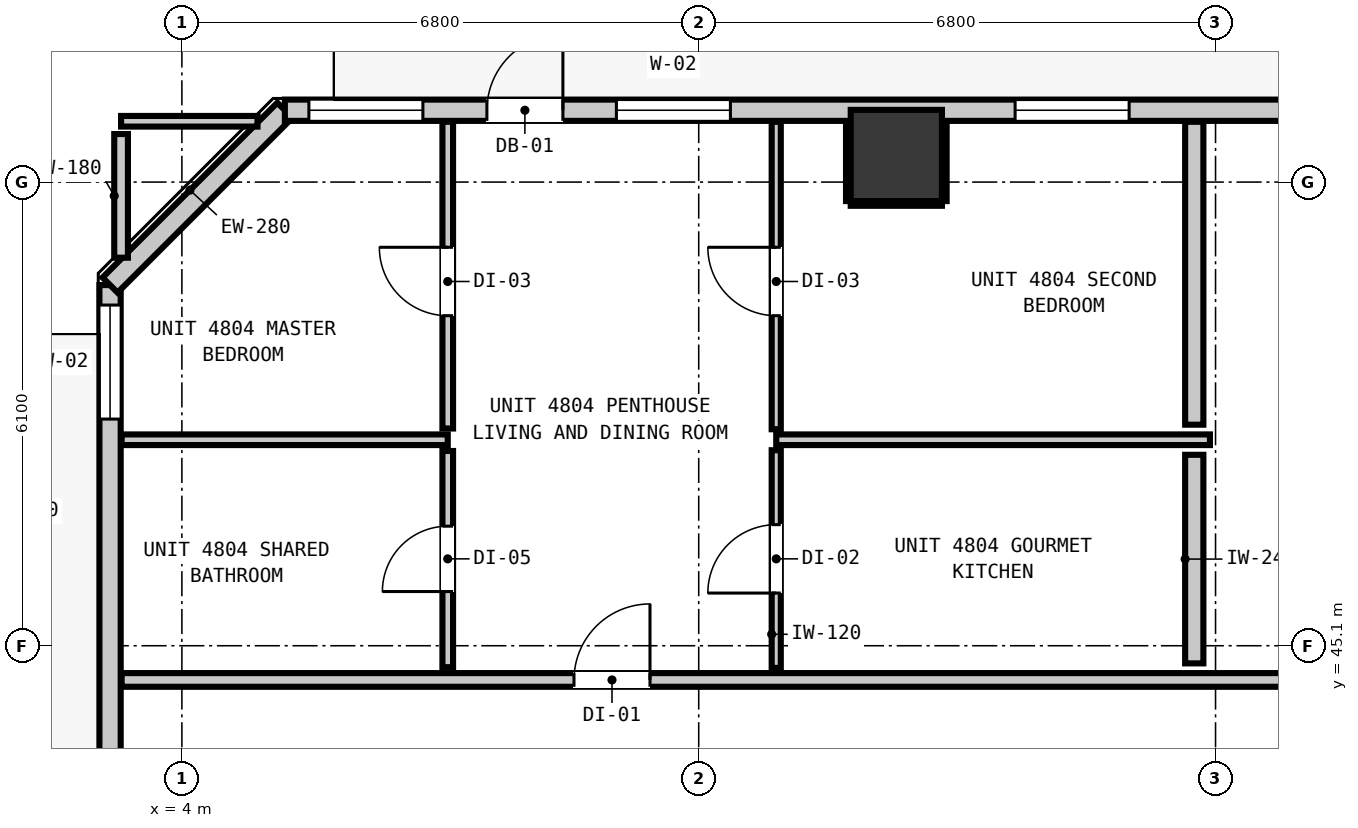
"""IFC4 building model, lengths in metres.
Left out: names, types, materials, properties, quantities, classifications, styles, units other than length and angle.
Written with IfcOpenShell. Run it as: python <this file> out.ifc"""

import sys

from ifc_helpers import new_model, si_unit, direction, frame, frame_2d, origin, origin_2d, place, context, subcontext, project, spatial, rectangle, extrude, element, fill, save


model = new_model("IFC4")
c1 = context("Model", 3, precision=1e-05, world=origin(), true_north=direction((0.0, 1.0)))
c2 = subcontext(c1, "Body", "Model", "MODEL_VIEW")
j1 = project(units=[si_unit("LENGTHUNIT", "METRE"), si_unit("PLANEANGLEUNIT", "RADIAN")], contexts=[c1])
p1 = place(None, origin())
s1 = spatial("IfcSite", under=j1, at=p1, CompositionType="ELEMENT")
p2 = place(p1, origin())
s2 = spatial("IfcBuilding", under=s1, at=p2, CompositionType="ELEMENT")
p3 = place(p2, frame((0.0, 0.0, 165.84)))
s3 = spatial("IfcBuildingStorey", under=s2, at=p3, CompositionType="ELEMENT", Elevation=165.84)
p4 = place(p3, frame((13.4, 51.55, -0.2), z_axis=(0.0, 0.0, 1.0), x_axis=(1.0, 0.0, 0.0)))
e1 = element("IfcColumn", 1, at=p4, inside=s3, PredefinedType="COLUMN", context=c2, shape_type="SweptSolid", body=[
    extrude(rectangle(XDim=1.2, YDim=1.2, at=origin_2d()), origin(), (0.0, 0.0, 1.0), 3.52),
])
p5 = place(p3, frame((3.055, 17.555, 0.0), z_axis=(0.0, 0.0, 1.0), x_axis=(0.0, 1.0, 0.0)))
e2 = element("IfcWall", 2, at=p5, inside=s3, PredefinedType="STANDARD", context=c2, shape_type="SweptSolid", body=[
    extrude(rectangle(XDim=32.29, YDim=0.28, at=frame_2d((16.145, 0.0))), origin(), (0.0, 0.0, 1.0), 3.08),
])
p6 = place(p5, frame((6.871, 0.0, 0.0)))
e3 = element("IfcOpeningElement", 3, at=p6, cuts=e2, PredefinedType="OPENING", context=c2, shape_type="SweptSolid", body=[
    extrude(rectangle(XDim=1.0, YDim=2.15, at=frame_2d((0.5, 1.075))), frame((0.0, 0.15, 0.0), z_axis=(0.0, -1.0, 0.0), x_axis=(1.0, 0.0, 0.0)), (0.0, 0.0, 1.0), 0.3),
])
p7 = place(p5, frame((30.527, 0.0, 0.85)))
e4 = element("IfcOpeningElement", 4, at=p7, cuts=e2, PredefinedType="OPENING", context=c2, shape_type="SweptSolid", body=[
    extrude(rectangle(XDim=1.5, YDim=1.8, at=frame_2d((0.75, 0.9))), frame((0.0, 0.15, 0.0), z_axis=(0.0, -1.0, 0.0), x_axis=(1.0, 0.0, 0.0)), (0.0, 0.0, 1.0), 0.3),
])
p8 = place(p5, frame((8.375, 0.0, 0.85)))
e5 = element("IfcOpeningElement", 5, at=p8, cuts=e2, PredefinedType="OPENING", context=c2, shape_type="SweptSolid", body=[
    extrude(rectangle(XDim=1.5, YDim=1.8, at=frame_2d((0.75, 0.9))), frame((0.0, 0.15, 0.0), z_axis=(0.0, -1.0, 0.0), x_axis=(1.0, 0.0, 0.0)), (0.0, 0.0, 1.0), 0.3),
])
p9 = place(p5, frame((10.762, 0.0, 0.85)))
e6 = element("IfcOpeningElement", 6, at=p9, cuts=e2, PredefinedType="OPENING", context=c2, shape_type="SweptSolid", body=[
    extrude(rectangle(XDim=1.5, YDim=1.8, at=frame_2d((0.75, 0.9))), frame((0.0, 0.15, 0.0), z_axis=(0.0, -1.0, 0.0), x_axis=(1.0, 0.0, 0.0)), (0.0, 0.0, 1.0), 0.3),
])
p10 = place(p5, frame((17.075, 0.0, 0.85)))
e7 = element("IfcOpeningElement", 7, at=p10, cuts=e2, PredefinedType="OPENING", context=c2, shape_type="SweptSolid", body=[
    extrude(rectangle(XDim=1.5, YDim=1.8, at=frame_2d((0.75, 0.9))), frame((0.0, 0.15, 0.0), z_axis=(0.0, -1.0, 0.0), x_axis=(1.0, 0.0, 0.0)), (0.0, 0.0, 1.0), 0.3),
])
p11 = place(p5, frame((20.113, 0.0, 0.85)))
e8 = element("IfcOpeningElement", 8, at=p11, cuts=e2, PredefinedType="OPENING", context=c2, shape_type="SweptSolid", body=[
    extrude(rectangle(XDim=1.05, YDim=1.65, at=frame_2d((0.525, 0.825))), frame((0.0, 0.15, 0.0), z_axis=(0.0, -1.0, 0.0), x_axis=(1.0, 0.0, 0.0)), (0.0, 0.0, 1.0), 0.3),
])
p12 = place(p3, frame((3.055, 49.845, 0.0), z_axis=(0.0, 0.0, 1.0), x_axis=(0.707106781187, 0.707106781187, 0.0)))
e9 = element("IfcWall", 9, at=p12, inside=s3, PredefinedType="STANDARD", context=c2, shape_type="SweptSolid", body=[
    extrude(rectangle(XDim=3.253, YDim=0.28, at=frame_2d((1.626, 0.0))), origin(), (0.0, 0.0, 1.0), 3.08),
])
p13 = place(p3, frame((5.355, 52.145, 0.0), z_axis=(0.0, 0.0, 1.0), x_axis=(1.0, 0.0, 0.0)))
e10 = element("IfcWall", 10, at=p13, inside=s3, PredefinedType="STANDARD", context=c2, shape_type="SweptSolid", body=[
    extrude(rectangle(XDim=35.09, YDim=0.28, at=frame_2d((17.545, 0.0))), origin(), (0.0, 0.0, 1.0), 3.08),
])
p14 = place(p13, frame((2.658, 0.0, 0.0)))
e11 = element("IfcOpeningElement", 11, at=p14, cuts=e10, PredefinedType="OPENING", context=c2, shape_type="SweptSolid", body=[
    extrude(rectangle(XDim=1.0, YDim=2.15, at=frame_2d((0.5, 1.075))), frame((0.0, 0.15, 0.0), z_axis=(0.0, -1.0, 0.0), x_axis=(1.0, 0.0, 0.0)), (0.0, 0.0, 1.0), 0.3),
])
p15 = place(p13, frame((4.362, 0.0, 0.85)))
e12 = element("IfcOpeningElement", 12, at=p15, cuts=e10, PredefinedType="OPENING", context=c2, shape_type="SweptSolid", body=[
    extrude(rectangle(XDim=1.5, YDim=1.8, at=frame_2d((0.75, 0.9))), frame((0.0, 0.15, 0.0), z_axis=(0.0, -1.0, 0.0), x_axis=(1.0, 0.0, 0.0)), (0.0, 0.0, 1.0), 0.3),
])
p16 = place(p13, frame((0.316, 0.0, 0.85)))
e13 = element("IfcOpeningElement", 13, at=p16, cuts=e10, PredefinedType="OPENING", context=c2, shape_type="SweptSolid", body=[
    extrude(rectangle(XDim=1.5, YDim=1.8, at=frame_2d((0.75, 0.9))), frame((0.0, 0.15, 0.0), z_axis=(0.0, -1.0, 0.0), x_axis=(1.0, 0.0, 0.0)), (0.0, 0.0, 1.0), 0.3),
])
p17 = place(p13, frame((9.608, 0.0, 0.85)))
e14 = element("IfcOpeningElement", 14, at=p17, cuts=e10, PredefinedType="OPENING", context=c2, shape_type="SweptSolid", body=[
    extrude(rectangle(XDim=1.5, YDim=1.8, at=frame_2d((0.75, 0.9))), frame((0.0, 0.15, 0.0), z_axis=(0.0, -1.0, 0.0), x_axis=(1.0, 0.0, 0.0)), (0.0, 0.0, 1.0), 0.3),
])
p18 = place(p13, frame((18.355, 0.0, 0.85)))
e15 = element("IfcOpeningElement", 15, at=p18, cuts=e10, PredefinedType="OPENING", context=c2, shape_type="SweptSolid", body=[
    extrude(rectangle(XDim=1.5, YDim=1.8, at=frame_2d((0.75, 0.9))), frame((0.0, 0.15, 0.0), z_axis=(0.0, -1.0, 0.0), x_axis=(1.0, 0.0, 0.0)), (0.0, 0.0, 1.0), 0.3),
])
p19 = place(p13, frame((27.784, 0.0, 0.85)))
e16 = element("IfcOpeningElement", 16, at=p19, cuts=e10, PredefinedType="OPENING", context=c2, shape_type="SweptSolid", body=[
    extrude(rectangle(XDim=1.5, YDim=1.8, at=frame_2d((0.75, 0.9))), frame((0.0, 0.15, 0.0), z_axis=(0.0, -1.0, 0.0), x_axis=(1.0, 0.0, 0.0)), (0.0, 0.0, 1.0), 0.3),
])
p20 = place(p3, frame((3.207, 44.65, 0.0), z_axis=(0.0, 0.0, 1.0), x_axis=(1.0, 0.0, 0.0)))
e17 = element("IfcWall", 17, at=p20, inside=s3, PredefinedType="PARTITIONING", context=c2, shape_type="SweptSolid", body=[
    extrude(rectangle(XDim=39.386, YDim=0.18, at=frame_2d((19.693, 0.0))), origin(), (0.0, 0.0, 1.0), 3.08),
])
p21 = place(p20, frame((5.952, 0.0, 0.0)))
e18 = element("IfcOpeningElement", 18, at=p21, cuts=e17, PredefinedType="OPENING", context=c2, shape_type="SweptSolid", body=[
    extrude(rectangle(XDim=1.0, YDim=2.15, at=frame_2d((0.5, 1.075))), frame((0.0, 0.1, 0.0), z_axis=(0.0, -1.0, 0.0), x_axis=(1.0, 0.0, 0.0)), (0.0, 0.0, 1.0), 0.2),
])
p22 = place(p20, frame((18.866, 0.0, 0.0)))
e19 = element("IfcOpeningElement", 19, at=p22, cuts=e17, PredefinedType="OPENING", context=c2, shape_type="SweptSolid", body=[
    extrude(rectangle(XDim=1.0, YDim=2.15, at=frame_2d((0.5, 1.075))), frame((0.0, 0.1, 0.0), z_axis=(0.0, -1.0, 0.0), x_axis=(1.0, 0.0, 0.0)), (0.0, 0.0, 1.0), 0.2),
])
p23 = place(p20, frame((33.508, 0.0, 0.0)))
e20 = element("IfcOpeningElement", 20, at=p23, cuts=e17, PredefinedType="OPENING", context=c2, shape_type="SweptSolid", body=[
    extrude(rectangle(XDim=0.9, YDim=2.1, at=frame_2d((0.45, 1.05))), frame((0.0, 0.1, 0.0), z_axis=(0.0, -1.0, 0.0), x_axis=(1.0, 0.0, 0.0)), (0.0, 0.0, 1.0), 0.2),
])
p24 = place(p3, frame((3.207, 47.81, 0.0), z_axis=(0.0, 0.0, 1.0), x_axis=(1.0, 0.0, 0.0)))
e21 = element("IfcWall", 21, at=p24, inside=s3, PredefinedType="PARTITIONING", context=c2, shape_type="SweptSolid", body=[
    extrude(rectangle(XDim=4.291, YDim=0.14, at=frame_2d((2.146, 0.0))), origin(), (0.0, 0.0, 1.0), 3.08),
])
p25 = place(p3, frame((11.82, 47.81, 0.0), z_axis=(0.0, 0.0, 1.0), x_axis=(1.0, 0.0, 0.0)))
e22 = element("IfcWall", 22, at=p25, inside=s3, PredefinedType="PARTITIONING", context=c2, shape_type="SweptSolid", body=[
    extrude(rectangle(XDim=5.706, YDim=0.14, at=frame_2d((2.853, 0.0))), origin(), (0.0, 0.0, 1.0), 3.08),
])
p26 = place(p3, frame((3.2, 52.0, 0.0), z_axis=(0.0, 0.0, 1.0), x_axis=(1.0, 0.0, 0.0)))
e23 = element("IfcWall", 23, at=p26, inside=s3, PredefinedType="PARTITIONING", context=c2, shape_type="SweptSolid", body=[
    extrude(rectangle(XDim=1.795, YDim=0.14, at=frame_2d((0.897, 0.0))), origin(), (0.0, 0.0, 1.0), 3.08),
])
p27 = place(p3, frame((17.32, 44.868, 0.0), z_axis=(0.0, 0.0, 1.0), x_axis=(0.0, 1.0, 0.0)))
e24 = element("IfcWall", 24, at=p27, inside=s3, PredefinedType="PARTITIONING", context=c2, shape_type="SweptSolid", body=[
    extrude(rectangle(XDim=2.744, YDim=0.24, at=frame_2d((1.372, 0.0))), origin(), (0.0, 0.0, 1.0), 3.08),
])
p28 = place(p3, frame((17.32, 48.008, 0.0), z_axis=(0.0, 0.0, 1.0), x_axis=(0.0, 1.0, 0.0)))
e25 = element("IfcWall", 25, at=p28, inside=s3, PredefinedType="PARTITIONING", context=c2, shape_type="SweptSolid", body=[
    extrude(rectangle(XDim=3.985, YDim=0.24, at=frame_2d((1.992, 0.0))), origin(), (0.0, 0.0, 1.0), 3.08),
])
p29 = place(p3, frame((3.2, 50.205, 0.0), z_axis=(0.0, 0.0, 1.0), x_axis=(0.0, 1.0, 0.0)))
e26 = element("IfcWall", 26, at=p29, inside=s3, PredefinedType="PARTITIONING", context=c2, shape_type="SweptSolid", body=[
    extrude(rectangle(XDim=1.627, YDim=0.18, at=frame_2d((0.813, 0.0))), origin(), (0.0, 0.0, 1.0), 3.08),
])
p30 = place(p3, frame((7.498, 44.818, 0.0), z_axis=(0.0, 0.0, 1.0), x_axis=(0.0, 1.0, 0.0)))
e27 = element("IfcWall", 27, at=p30, inside=s3, PredefinedType="PARTITIONING", context=c2, shape_type="SweptSolid", body=[
    extrude(rectangle(XDim=2.844, YDim=0.14, at=frame_2d((1.422, 0.0))), origin(), (0.0, 0.0, 1.0), 3.08),
])
p31 = place(p30, frame((0.995, 0.0, 0.0)))
e28 = element("IfcOpeningElement", 28, at=p31, cuts=e27, PredefinedType="OPENING", context=c2, shape_type="SweptSolid", body=[
    extrude(rectangle(XDim=0.86, YDim=2.02, at=frame_2d((0.43, 1.01))), frame((0.0, 0.08, 0.0), z_axis=(0.0, -1.0, 0.0), x_axis=(1.0, 0.0, 0.0)), (0.0, 0.0, 1.0), 0.16),
])
p32 = place(p3, frame((7.498, 47.958, 0.0), z_axis=(0.0, 0.0, 1.0), x_axis=(0.0, 1.0, 0.0)))
e29 = element("IfcWall", 29, at=p32, inside=s3, PredefinedType="PARTITIONING", context=c2, shape_type="SweptSolid", body=[
    extrude(rectangle(XDim=4.035, YDim=0.14, at=frame_2d((2.018, 0.0))), origin(), (0.0, 0.0, 1.0), 3.08),
])
p33 = place(p32, frame((1.484, 0.0, 0.0)))
e30 = element("IfcOpeningElement", 30, at=p33, cuts=e29, PredefinedType="OPENING", context=c2, shape_type="SweptSolid", body=[
    extrude(rectangle(XDim=0.9, YDim=2.1, at=frame_2d((0.45, 1.05))), frame((0.0, 0.08, 0.0), z_axis=(0.0, -1.0, 0.0), x_axis=(1.0, 0.0, 0.0)), (0.0, 0.0, 1.0), 0.16),
])
p34 = place(p3, frame((11.82, 44.808, 0.0), z_axis=(0.0, 0.0, 1.0), x_axis=(0.0, 1.0, 0.0)))
e31 = element("IfcWall", 31, at=p34, inside=s3, PredefinedType="PARTITIONING", context=c2, shape_type="SweptSolid", body=[
    extrude(rectangle(XDim=2.864, YDim=0.12, at=frame_2d((1.432, 0.0))), origin(), (0.0, 0.0, 1.0), 3.08),
])
p35 = place(p34, frame((0.985, 0.0, 0.0)))
e32 = element("IfcOpeningElement", 32, at=p35, cuts=e31, PredefinedType="OPENING", context=c2, shape_type="SweptSolid", body=[
    extrude(rectangle(XDim=0.9, YDim=2.1, at=frame_2d((0.45, 1.05))), frame((0.0, 0.07, 0.0), z_axis=(0.0, -1.0, 0.0), x_axis=(1.0, 0.0, 0.0)), (0.0, 0.0, 1.0), 0.14),
])
p36 = place(p3, frame((11.82, 47.948, 0.0), z_axis=(0.0, 0.0, 1.0), x_axis=(0.0, 1.0, 0.0)))
e33 = element("IfcWall", 33, at=p36, inside=s3, PredefinedType="PARTITIONING", context=c2, shape_type="SweptSolid", body=[
    extrude(rectangle(XDim=4.045, YDim=0.12, at=frame_2d((2.022, 0.0))), origin(), (0.0, 0.0, 1.0), 3.08),
])
p37 = place(p36, frame((1.494, 0.0, 0.0)))
e34 = element("IfcOpeningElement", 34, at=p37, cuts=e33, PredefinedType="OPENING", context=c2, shape_type="SweptSolid", body=[
    extrude(rectangle(XDim=0.9, YDim=2.1, at=frame_2d((0.45, 1.05))), frame((0.0, 0.07, 0.0), z_axis=(0.0, -1.0, 0.0), x_axis=(1.0, 0.0, 0.0)), (0.0, 0.0, 1.0), 0.14),
])
p38 = place(p3, frame((12.8, 50.918, 0.0), z_axis=(0.0, 0.0, 1.0), x_axis=(1.0, 0.0, 0.0)))
e35 = element("IfcWall", 35, at=p38, inside=s3, PredefinedType="PARTITIONING", context=c2, shape_type="SweptSolid", body=[
    extrude(rectangle(XDim=1.2, YDim=0.06, at=frame_2d((0.6, 0.0))), origin(), (0.0, 0.0, 1.0), 1.45),
])
for number, where, z_axis, x_axis in (
    (36, (12.768, 50.95, 0.0), (0.0, 0.0, 1.0), (0.0, 1.0, 0.0)),
    (37, (14.032, 50.95, 0.0), (0.0, 0.0, 1.0), (0.0, 1.0, 0.0)),
):
    element("IfcWall", number, at=place(p3, frame(where, z_axis=z_axis, x_axis=x_axis)), inside=s3, PredefinedType="PARTITIONING", context=c2, shape_type="SweptSolid", body=[
        extrude(rectangle(XDim=1.04, YDim=0.06, at=frame_2d((0.52, 0.0))), origin(), (0.0, 0.0, 1.0), 1.45),
    ])
p39 = place(p14, origin())
e38 = element("IfcDoor", 38, at=p39, inside=s3, OperationType="SINGLE_SWING_RIGHT", PredefinedType="DOOR", context=c2, shape_type="SweptSolid", body=[
    extrude(rectangle(XDim=1.0, YDim=2.15, at=frame_2d((0.5, 1.075))), frame((0.0, 0.025, 0.0), z_axis=(0.0, -1.0, 0.0), x_axis=(1.0, 0.0, 0.0)), (0.0, 0.0, 1.0), 0.05),
])
fill(e11, e38)
p40 = place(p7, origin())
e39 = element("IfcWindow", 39, at=p40, inside=s3, PartitioningType="SINGLE_PANEL", PredefinedType="WINDOW", context=c2, shape_type="SweptSolid", body=[
    extrude(rectangle(XDim=1.5, YDim=1.8, at=frame_2d((0.75, 0.9))), frame((0.0, 0.03, 0.0), z_axis=(0.0, -1.0, 0.0), x_axis=(1.0, 0.0, 0.0)), (0.0, 0.0, 1.0), 0.06),
])
fill(e4, e39)
p41 = place(p15, origin())
e40 = element("IfcWindow", 40, at=p41, inside=s3, PartitioningType="SINGLE_PANEL", PredefinedType="WINDOW", context=c2, shape_type="SweptSolid", body=[
    extrude(rectangle(XDim=1.5, YDim=1.8, at=frame_2d((0.75, 0.9))), frame((0.0, 0.03, 0.0), z_axis=(0.0, -1.0, 0.0), x_axis=(1.0, 0.0, 0.0)), (0.0, 0.0, 1.0), 0.06),
])
fill(e12, e40)
p42 = place(p16, origin())
e41 = element("IfcWindow", 41, at=p42, inside=s3, PartitioningType="SINGLE_PANEL", PredefinedType="WINDOW", context=c2, shape_type="SweptSolid", body=[
    extrude(rectangle(XDim=1.5, YDim=1.8, at=frame_2d((0.75, 0.9))), frame((0.0, 0.03, 0.0), z_axis=(0.0, -1.0, 0.0), x_axis=(1.0, 0.0, 0.0)), (0.0, 0.0, 1.0), 0.06),
])
fill(e13, e41)
p43 = place(p17, origin())
e42 = element("IfcWindow", 42, at=p43, inside=s3, PartitioningType="SINGLE_PANEL", PredefinedType="WINDOW", context=c2, shape_type="SweptSolid", body=[
    extrude(rectangle(XDim=1.5, YDim=1.8, at=frame_2d((0.75, 0.9))), frame((0.0, 0.03, 0.0), z_axis=(0.0, -1.0, 0.0), x_axis=(1.0, 0.0, 0.0)), (0.0, 0.0, 1.0), 0.06),
])
fill(e14, e42)
p44 = place(p21, origin())
e43 = element("IfcDoor", 43, at=p44, inside=s3, OperationType="SINGLE_SWING_RIGHT", PredefinedType="DOOR", context=c2, shape_type="SweptSolid", body=[
    extrude(rectangle(XDim=1.0, YDim=2.15, at=frame_2d((0.5, 1.075))), frame((0.0, 0.025, 0.0), z_axis=(0.0, -1.0, 0.0), x_axis=(1.0, 0.0, 0.0)), (0.0, 0.0, 1.0), 0.05),
])
fill(e18, e43)
p45 = place(p31, origin())
e44 = element("IfcDoor", 44, at=p45, inside=s3, OperationType="SINGLE_SWING_LEFT", PredefinedType="DOOR", context=c2, shape_type="SweptSolid", body=[
    extrude(rectangle(XDim=0.86, YDim=2.02, at=frame_2d((0.43, 1.01))), frame((0.0, 0.025, 0.0), z_axis=(0.0, -1.0, 0.0), x_axis=(1.0, 0.0, 0.0)), (0.0, 0.0, 1.0), 0.05),
])
fill(e28, e44)
p46 = place(p33, origin())
e45 = element("IfcDoor", 45, at=p46, inside=s3, OperationType="SINGLE_SWING_RIGHT", PredefinedType="DOOR", context=c2, shape_type="SweptSolid", body=[
    extrude(rectangle(XDim=0.9, YDim=2.1, at=frame_2d((0.45, 1.05))), frame((0.0, 0.025, 0.0), z_axis=(0.0, -1.0, 0.0), x_axis=(1.0, 0.0, 0.0)), (0.0, 0.0, 1.0), 0.05),
])
fill(e30, e45)
p47 = place(p35, origin())
e46 = element("IfcDoor", 46, at=p47, inside=s3, OperationType="SINGLE_SWING_LEFT", PredefinedType="DOOR", context=c2, shape_type="SweptSolid", body=[
    extrude(rectangle(XDim=0.9, YDim=2.1, at=frame_2d((0.45, 1.05))), frame((0.0, 0.025, 0.0), z_axis=(0.0, -1.0, 0.0), x_axis=(1.0, 0.0, 0.0)), (0.0, 0.0, 1.0), 0.05),
])
fill(e32, e46)
p48 = place(p37, origin())
e47 = element("IfcDoor", 47, at=p48, inside=s3, OperationType="SINGLE_SWING_RIGHT", PredefinedType="DOOR", context=c2, shape_type="SweptSolid", body=[
    extrude(rectangle(XDim=0.9, YDim=2.1, at=frame_2d((0.45, 1.05))), frame((0.0, 0.025, 0.0), z_axis=(0.0, -1.0, 0.0), x_axis=(1.0, 0.0, 0.0)), (0.0, 0.0, 1.0), 0.05),
])
fill(e34, e47)
save(model, sys.argv[1])
